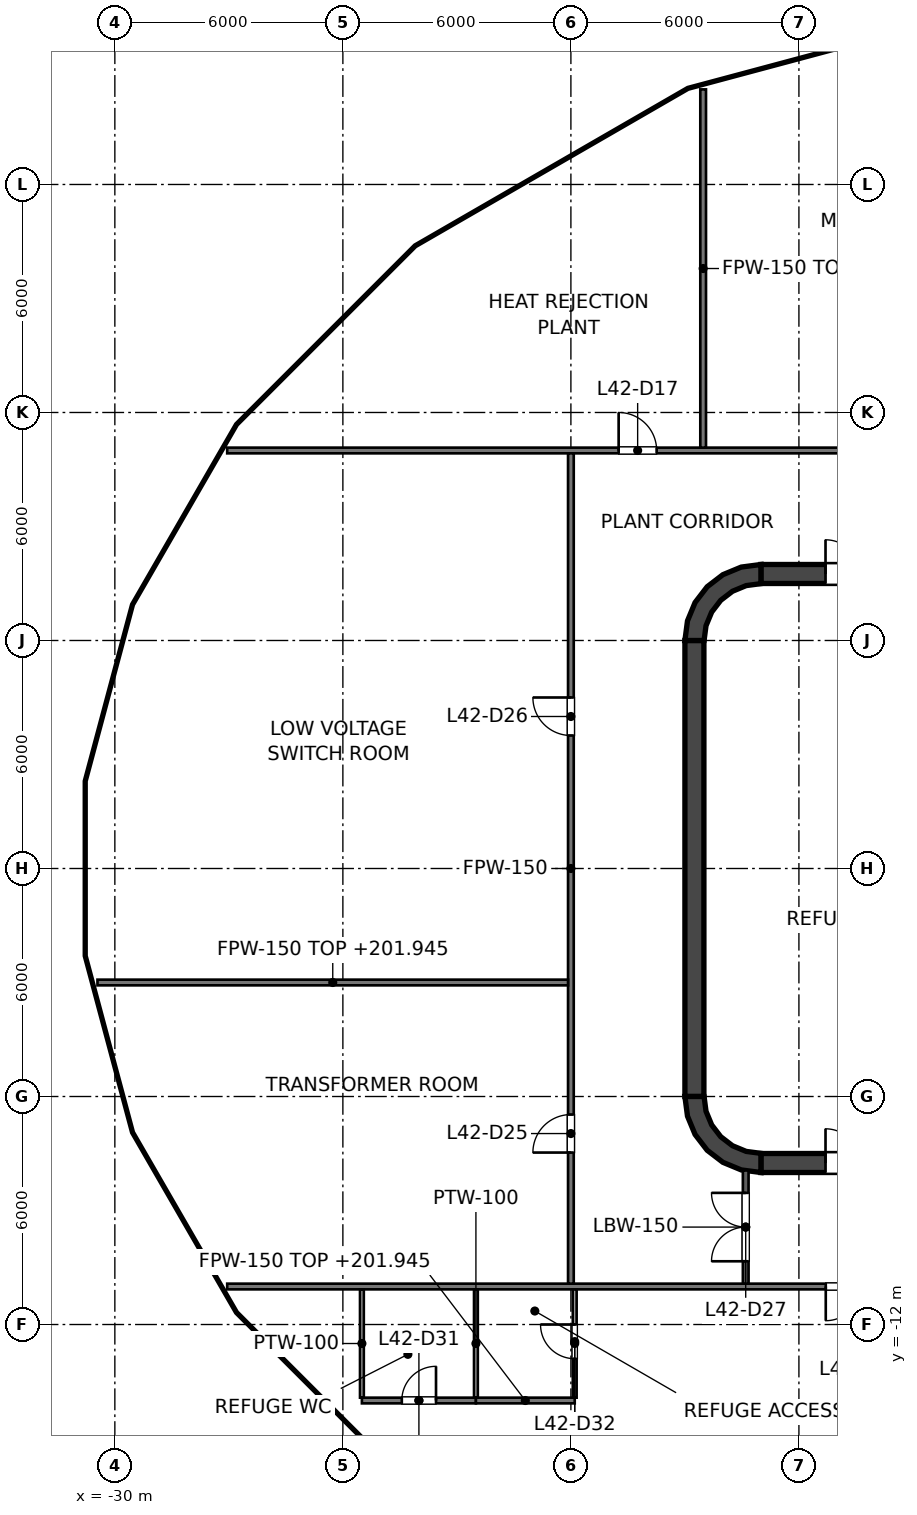
"""IFC4 building model, lengths in metres.
Left out: names, types, materials, properties, quantities, classifications, styles, units other than length and angle.
Written with IfcOpenShell. Run it as: python <this file> out.ifc"""

import sys

from ifc_helpers import new_model, si_unit, direction, frame, frame_2d, origin, place, context, subcontext, project, spatial, polyline, rectangle, outline, extrude, element, fill, save


model = new_model("IFC4")
c1 = context("Model", 3, precision=1e-05, world=origin(), true_north=direction((0.0, 1.0)))
c2 = subcontext(c1, "Body", "Model", "MODEL_VIEW")
j1 = project(units=[si_unit("LENGTHUNIT", "METRE"), si_unit("PLANEANGLEUNIT", "RADIAN")], contexts=[c1])
p1 = place(None, origin())
s1 = spatial("IfcSite", under=j1, at=p1, CompositionType="ELEMENT")
p2 = place(p1, origin())
s2 = spatial("IfcBuilding", under=s1, at=p2, CompositionType="ELEMENT")
p3 = place(p2, frame((0.0, 0.0, 197.6)))
s3 = spatial("IfcBuildingStorey", under=s2, at=p3, CompositionType="ELEMENT", Elevation=197.6)
p4 = place(p3, frame((-13.0, 7.75, 0.0), z_axis=(0.0, 0.0, 1.0), x_axis=(1.0, 0.0, 0.0)))
e1 = element("IfcWall", 1, at=p4, inside=s3, PredefinedType="SHEAR", context=c2, shape_type="SweptSolid", body=[
    extrude(rectangle(XDim=26.0, YDim=0.5, at=frame_2d((13.0, 0.0))), origin(), (0.0, 0.0, 1.0), 5.4),
])
p5 = place(p4, frame((1.7, 0.0, 0.0)))
e2 = element("IfcOpeningElement", 2, at=p5, cuts=e1, PredefinedType="OPENING", context=c2, shape_type="SweptSolid", body=[
    extrude(rectangle(XDim=1.8, YDim=2.1, at=frame_2d((0.9, 1.05))), frame((0.0, 0.25, 0.0), z_axis=(0.0, -1.0, 0.0), x_axis=(1.0, 0.0, 0.0)), (0.0, 0.0, 1.0), 0.5),
])
p6 = place(p4, frame((22.5, 0.0, 0.0)))
e3 = element("IfcOpeningElement", 3, at=p6, cuts=e1, PredefinedType="OPENING", context=c2, shape_type="SweptSolid", body=[
    extrude(rectangle(XDim=1.8, YDim=2.1, at=frame_2d((0.9, 1.05))), frame((0.0, 0.25, 0.0), z_axis=(0.0, -1.0, 0.0), x_axis=(1.0, 0.0, 0.0)), (0.0, 0.0, 1.0), 0.5),
])
p7 = place(p3, frame((-13.0, -7.75, 0.0), z_axis=(0.0, 0.0, 1.0), x_axis=(1.0, 0.0, 0.0)))
e4 = element("IfcWall", 4, at=p7, inside=s3, PredefinedType="SHEAR", context=c2, shape_type="SweptSolid", body=[
    extrude(rectangle(XDim=26.0, YDim=0.5, at=frame_2d((13.0, 0.0))), origin(), (0.0, 0.0, 1.0), 5.4),
])
p8 = place(p7, frame((1.7, 0.0, 0.0)))
e5 = element("IfcOpeningElement", 5, at=p8, cuts=e4, PredefinedType="OPENING", context=c2, shape_type="SweptSolid", body=[
    extrude(rectangle(XDim=1.8, YDim=2.1, at=frame_2d((0.9, 1.05))), frame((0.0, 0.25, 0.0), z_axis=(0.0, -1.0, 0.0), x_axis=(1.0, 0.0, 0.0)), (0.0, 0.0, 1.0), 0.5),
])
p9 = place(p7, frame((22.5, 0.0, 0.0)))
e6 = element("IfcOpeningElement", 6, at=p9, cuts=e4, PredefinedType="OPENING", context=c2, shape_type="SweptSolid", body=[
    extrude(rectangle(XDim=1.8, YDim=2.1, at=frame_2d((0.9, 1.05))), frame((0.0, 0.25, 0.0), z_axis=(0.0, -1.0, 0.0), x_axis=(1.0, 0.0, 0.0)), (0.0, 0.0, 1.0), 0.5),
])
p10 = place(p3, frame((-14.75, -6.0, 0.0), z_axis=(0.0, 0.0, 1.0), x_axis=(0.0, 1.0, 0.0)))
e7 = element("IfcWall", 7, at=p10, inside=s3, PredefinedType="SHEAR", context=c2, shape_type="SweptSolid", body=[
    extrude(rectangle(XDim=12.0, YDim=0.5, at=frame_2d((6.0, 0.0))), origin(), (0.0, 0.0, 1.0), 5.4),
])
p11 = place(p3, origin())
e8 = element("IfcWall", 8, at=p11, inside=s3, PredefinedType="SHEAR", context=c2, shape_type="SweptSolid", body=[
    extrude(outline(polyline([(-15.0, 6.0), (-14.496, 6.0), (-14.445, 6.387), (-14.295, 6.748), (-14.058, 7.058), (-13.748, 7.295), (-13.387, 7.445), (-13.0, 7.496), (-13.0, 8.0), (-13.518, 7.932), (-14.0, 7.732), (-14.414, 7.414), (-14.732, 7.0), (-14.932, 6.518), (-15.0, 6.0)])), origin(), (0.0, 0.0, 1.0), 5.4),
])
e9 = element("IfcWall", 9, at=p11, inside=s3, PredefinedType="SHEAR", context=c2, shape_type="SweptSolid", body=[
    extrude(outline(polyline([(-13.0, -8.0), (-13.0, -7.496), (-13.387, -7.445), (-13.748, -7.295), (-14.058, -7.058), (-14.295, -6.748), (-14.445, -6.387), (-14.496, -6.0), (-15.0, -6.0), (-14.932, -6.518), (-14.732, -7.0), (-14.414, -7.414), (-14.0, -7.732), (-13.518, -7.932), (-13.0, -8.0)])), origin(), (0.0, 0.0, 1.0), 5.4),
])
p12 = place(p3, frame((-11.8, -7.5, 0.0), z_axis=(0.0, 0.0, 1.0), x_axis=(0.0, 1.0, 0.0)))
e10 = element("IfcWall", 10, at=p12, inside=s3, PredefinedType="SOLIDWALL", context=c2, shape_type="SweptSolid", body=[
    extrude(rectangle(XDim=15.0, YDim=0.4, at=frame_2d((7.5, 0.0))), origin(), (0.0, 0.0, 1.0), 5.2),
])
p13 = place(p12, frame((13.697, 0.0, 0.0)))
e11 = element("IfcOpeningElement", 11, at=p13, cuts=e10, PredefinedType="OPENING", context=c2, shape_type="SweptSolid", body=[
    extrude(rectangle(XDim=0.9, YDim=2.1, at=frame_2d((0.45, 1.05))), frame((0.0, 0.2, 0.0), z_axis=(0.0, -1.0, 0.0), x_axis=(1.0, 0.0, 0.0)), (0.0, 0.0, 1.0), 0.4),
])
p14 = place(p12, frame((0.403, 0.0, 0.0)))
e12 = element("IfcOpeningElement", 12, at=p14, cuts=e10, PredefinedType="OPENING", context=c2, shape_type="SweptSolid", body=[
    extrude(rectangle(XDim=0.9, YDim=2.1, at=frame_2d((0.45, 1.05))), frame((0.0, 0.2, 0.0), z_axis=(0.0, -1.0, 0.0), x_axis=(1.0, 0.0, 0.0)), (0.0, 0.0, 1.0), 0.4),
])
e13 = element("IfcWall", 13, at=p11, inside=s3, PredefinedType="SOLIDWALL", context=c2, shape_type="SweptSolid", body=[
    extrude(outline(polyline([(-12.0, -5.925), (-12.0, -5.675), (-14.25, -5.675), (-14.25, -3.025), (-12.0, -3.025), (-12.0, -2.775), (-14.25, -2.775), (-14.25, -0.125), (-12.0, -0.125), (-12.0, 0.125), (-14.25, 0.125), (-14.25, 2.775), (-12.0, 2.775), (-12.0, 3.025), (-14.25, 3.025), (-14.25, 5.675), (-12.0, 5.675), (-12.0, 5.925), (-14.25, 5.925), (-14.5, 5.925), (-14.5, 5.675), (-14.5, 3.025), (-14.5, 2.775), (-14.5, 0.125), (-14.5, -0.125), (-14.5, -2.775), (-14.5, -3.025), (-14.5, -5.675), (-14.5, -5.925), (-14.25, -5.925), (-12.0, -5.925)])), origin(), (0.0, 0.0, 1.0), 5.2),
])
p15 = place(p3, frame((-27.044, 11.0, 0.0), z_axis=(0.0, 0.0, 1.0), x_axis=(1.0, 0.0, 0.0)))
e14 = element("IfcWall", 14, at=p15, inside=s3, PredefinedType="PARTITIONING", context=c2, shape_type="SweptSolid", body=[
    extrude(rectangle(XDim=54.087, YDim=0.15, at=frame_2d((27.044, 0.0))), origin(), (0.0, 0.0, 1.0), 4.277),
])
p16 = place(p15, frame((10.3, 0.0, 0.0)))
e15 = element("IfcOpeningElement", 15, at=p16, cuts=e14, PredefinedType="OPENING", context=c2, shape_type="SweptSolid", body=[
    extrude(rectangle(XDim=1.0, YDim=2.1, at=frame_2d((0.5, 1.05))), frame((0.0, 0.075, 0.0), z_axis=(0.0, -1.0, 0.0), x_axis=(1.0, 0.0, 0.0)), (0.0, 0.0, 1.0), 0.15),
])
p17 = place(p15, frame((17.3, 0.0, 0.0)))
e16 = element("IfcOpeningElement", 16, at=p17, cuts=e14, PredefinedType="OPENING", context=c2, shape_type="SweptSolid", body=[
    extrude(rectangle(XDim=1.0, YDim=2.1, at=frame_2d((0.5, 1.05))), frame((0.0, 0.075, 0.0), z_axis=(0.0, -1.0, 0.0), x_axis=(1.0, 0.0, 0.0)), (0.0, 0.0, 1.0), 0.15),
])
p18 = place(p15, frame((34.85, 0.0, 0.0)))
e17 = element("IfcOpeningElement", 17, at=p18, cuts=e14, PredefinedType="OPENING", context=c2, shape_type="SweptSolid", body=[
    extrude(rectangle(XDim=1.0, YDim=2.1, at=frame_2d((0.5, 1.05))), frame((0.0, 0.075, 0.0), z_axis=(0.0, -1.0, 0.0), x_axis=(1.0, 0.0, 0.0)), (0.0, 0.0, 1.0), 0.15),
])
p19 = place(p15, frame((42.8, 0.0, 0.0)))
e18 = element("IfcOpeningElement", 18, at=p19, cuts=e14, PredefinedType="OPENING", context=c2, shape_type="SweptSolid", body=[
    extrude(rectangle(XDim=1.0, YDim=2.1, at=frame_2d((0.5, 1.05))), frame((0.0, 0.075, 0.0), z_axis=(0.0, -1.0, 0.0), x_axis=(1.0, 0.0, 0.0)), (0.0, 0.0, 1.0), 0.15),
])
p20 = place(p15, frame((25.15, 0.0, 0.0)))
e19 = element("IfcOpeningElement", 19, at=p20, cuts=e14, PredefinedType="OPENING", context=c2, shape_type="SweptSolid", body=[
    extrude(rectangle(XDim=1.8, YDim=2.1, at=frame_2d((0.9, 1.05))), frame((0.0, 0.075, 0.0), z_axis=(0.0, -1.0, 0.0), x_axis=(1.0, 0.0, 0.0)), (0.0, 0.0, 1.0), 0.15),
])
p21 = place(p3, frame((-27.044, -11.0, 0.0), z_axis=(0.0, 0.0, 1.0), x_axis=(1.0, 0.0, 0.0)))
e20 = element("IfcWall", 20, at=p21, inside=s3, PredefinedType="PARTITIONING", context=c2, shape_type="SweptSolid", body=[
    extrude(rectangle(XDim=54.087, YDim=0.15, at=frame_2d((27.044, 0.0))), origin(), (0.0, 0.0, 1.0), 4.277),
])
p22 = place(p21, frame((36.0, 0.0, 0.0)))
e21 = element("IfcOpeningElement", 21, at=p22, cuts=e20, PredefinedType="OPENING", context=c2, shape_type="SweptSolid", body=[
    extrude(rectangle(XDim=1.0, YDim=2.1, at=frame_2d((0.5, 1.05))), frame((0.0, 0.075, 0.0), z_axis=(0.0, -1.0, 0.0), x_axis=(1.0, 0.0, 0.0)), (0.0, 0.0, 1.0), 0.15),
])
p23 = place(p21, frame((43.05, 0.0, 0.0)))
e22 = element("IfcOpeningElement", 22, at=p23, cuts=e20, PredefinedType="OPENING", context=c2, shape_type="SweptSolid", body=[
    extrude(rectangle(XDim=1.0, YDim=2.1, at=frame_2d((0.5, 1.05))), frame((0.0, 0.075, 0.0), z_axis=(0.0, -1.0, 0.0), x_axis=(1.0, 0.0, 0.0)), (0.0, 0.0, 1.0), 0.15),
])
p24 = place(p21, frame((15.75, 0.0, 0.0)))
e23 = element("IfcOpeningElement", 23, at=p24, cuts=e20, PredefinedType="OPENING", context=c2, shape_type="SweptSolid", body=[
    extrude(rectangle(XDim=1.8, YDim=2.1, at=frame_2d((0.9, 1.05))), frame((0.0, 0.075, 0.0), z_axis=(0.0, -1.0, 0.0), x_axis=(1.0, 0.0, 0.0)), (0.0, 0.0, 1.0), 0.15),
])
p25 = place(p21, frame((21.45, 0.0, 0.0)))
e24 = element("IfcOpeningElement", 24, at=p25, cuts=e20, PredefinedType="OPENING", context=c2, shape_type="SweptSolid", body=[
    extrude(rectangle(XDim=1.8, YDim=2.1, at=frame_2d((0.9, 1.05))), frame((0.0, 0.075, 0.0), z_axis=(0.0, -1.0, 0.0), x_axis=(1.0, 0.0, 0.0)), (0.0, 0.0, 1.0), 0.15),
])
p26 = place(p21, frame((27.15, 0.0, 0.0)))
e25 = element("IfcOpeningElement", 25, at=p26, cuts=e20, PredefinedType="OPENING", context=c2, shape_type="SweptSolid", body=[
    extrude(rectangle(XDim=1.8, YDim=2.1, at=frame_2d((0.9, 1.05))), frame((0.0, 0.075, 0.0), z_axis=(0.0, -1.0, 0.0), x_axis=(1.0, 0.0, 0.0)), (0.0, 0.0, 1.0), 0.15),
])
p27 = place(p3, frame((-18.0, -10.925, 0.0), z_axis=(0.0, 0.0, 1.0), x_axis=(0.0, 1.0, 0.0)))
e26 = element("IfcWall", 26, at=p27, inside=s3, PredefinedType="PARTITIONING", context=c2, shape_type="SweptSolid", body=[
    extrude(rectangle(XDim=21.85, YDim=0.15, at=frame_2d((10.925, 0.0))), origin(), (0.0, 0.0, 1.0), 4.277),
])
p28 = place(p27, frame((3.45, 0.0, 0.0)))
e27 = element("IfcOpeningElement", 27, at=p28, cuts=e26, PredefinedType="OPENING", context=c2, shape_type="SweptSolid", body=[
    extrude(rectangle(XDim=1.0, YDim=2.1, at=frame_2d((0.5, 1.05))), frame((0.0, 0.075, 0.0), z_axis=(0.0, -1.0, 0.0), x_axis=(1.0, 0.0, 0.0)), (0.0, 0.0, 1.0), 0.15),
])
p29 = place(p27, frame((14.425, 0.0, 0.0)))
e28 = element("IfcOpeningElement", 28, at=p29, cuts=e26, PredefinedType="OPENING", context=c2, shape_type="SweptSolid", body=[
    extrude(rectangle(XDim=1.0, YDim=2.1, at=frame_2d((0.5, 1.05))), frame((0.0, 0.075, 0.0), z_axis=(0.0, -1.0, 0.0), x_axis=(1.0, 0.0, 0.0)), (0.0, 0.0, 1.0), 0.15),
])
p30 = place(p3, frame((-13.4, -10.925, 0.0), z_axis=(0.0, 0.0, 1.0), x_axis=(0.0, 1.0, 0.0)))
e29 = element("IfcWall", 29, at=p30, inside=s3, PredefinedType="PARTITIONING", context=c2, shape_type="SweptSolid", body=[
    extrude(rectangle(XDim=2.978, YDim=0.15, at=frame_2d((1.489, 0.0))), origin(), (0.0, 0.0, 1.0), 4.345),
])
p31 = place(p30, frame((0.589, 0.0, 0.0)))
e30 = element("IfcOpeningElement", 30, at=p31, cuts=e29, PredefinedType="OPENING", context=c2, shape_type="SweptSolid", body=[
    extrude(rectangle(XDim=1.8, YDim=2.1, at=frame_2d((0.9, 1.05))), frame((0.0, 0.075, 0.0), z_axis=(0.0, -1.0, 0.0), x_axis=(1.0, 0.0, 0.0)), (0.0, 0.0, 1.0), 0.15),
])
p32 = place(p3, frame((-14.52, 11.075, 0.0), z_axis=(0.0, 0.0, 1.0), x_axis=(0.0, 1.0, 0.0)))
e31 = element("IfcWall", 31, at=p32, inside=s3, PredefinedType="PARTITIONING", context=c2, shape_type="SweptSolid", body=[
    extrude(rectangle(XDim=9.427, YDim=0.15, at=frame_2d((4.714, 0.0))), origin(), (0.0, 0.0, 1.0), 4.345),
])
p33 = place(p3, frame((-18.075, -3.0, 0.0), z_axis=(0.0, 0.0, 1.0), x_axis=(-1.0, 0.0, 0.0)))
e32 = element("IfcWall", 32, at=p33, inside=s3, PredefinedType="PARTITIONING", context=c2, shape_type="SweptSolid", body=[
    extrude(rectangle(XDim=12.383, YDim=0.15, at=frame_2d((6.191, 0.0))), origin(), (0.0, 0.0, 1.0), 4.345),
])
p34 = place(p3, frame((-23.499, -14.0, 0.0), z_axis=(0.0, 0.0, 1.0), x_axis=(1.0, 0.0, 0.0)))
e33 = element("IfcWall", 33, at=p34, inside=s3, PredefinedType="PARTITIONING", context=c2, shape_type="SweptSolid", body=[
    extrude(rectangle(XDim=3.0, YDim=0.15, at=frame_2d((1.5, 0.0))), origin(), (0.0, 0.0, 1.0), 5.2),
])
p35 = place(p34, frame((1.05, 0.0, 0.0)))
e34 = element("IfcOpeningElement", 34, at=p35, cuts=e33, PredefinedType="OPENING", context=c2, shape_type="SweptSolid", body=[
    extrude(rectangle(XDim=0.9, YDim=2.1, at=frame_2d((0.45, 1.05))), frame((0.0, 0.075, 0.0), z_axis=(0.0, -1.0, 0.0), x_axis=(1.0, 0.0, 0.0)), (0.0, 0.0, 1.0), 0.15),
])
p36 = place(p3, frame((-20.499, -14.0, 0.0), z_axis=(0.0, 0.0, 1.0), x_axis=(1.0, 0.0, 0.0)))
e35 = element("IfcWall", 35, at=p36, inside=s3, PredefinedType="PARTITIONING", context=c2, shape_type="SweptSolid", body=[
    extrude(rectangle(XDim=2.6, YDim=0.15, at=frame_2d((1.3, 0.0))), origin(), (0.0, 0.0, 1.0), 4.345),
])
for number, where, z_axis, x_axis in (
    (36, (-23.499, -13.925, 0.0), (0.0, 0.0, 1.0), (0.0, 1.0, 0.0)),
    (37, (-20.499, -13.925, 0.0), (0.0, 0.0, 1.0), (0.0, 1.0, 0.0)),
):
    element("IfcWall", number, at=place(p3, frame(where, z_axis=z_axis, x_axis=x_axis)), inside=s3, PredefinedType="PARTITIONING", context=c2, shape_type="SweptSolid", body=[
        extrude(rectangle(XDim=2.85, YDim=0.1, at=frame_2d((1.425, 0.0))), origin(), (0.0, 0.0, 1.0), 4.502),
    ])
p37 = place(p3, frame((-17.899, -13.925, 0.0), z_axis=(0.0, 0.0, 1.0), x_axis=(0.0, 1.0, 0.0)))
e38 = element("IfcWall", 38, at=p37, inside=s3, PredefinedType="PARTITIONING", context=c2, shape_type="SweptSolid", body=[
    extrude(rectangle(XDim=2.85, YDim=0.1, at=frame_2d((1.425, 0.0))), origin(), (0.0, 0.0, 1.0), 4.345),
])
p38 = place(p37, frame((1.025, 0.0, 0.0)))
e39 = element("IfcOpeningElement", 39, at=p38, cuts=e38, PredefinedType="OPENING", context=c2, shape_type="SweptSolid", body=[
    extrude(rectangle(XDim=0.9, YDim=2.1, at=frame_2d((0.45, 1.05))), frame((0.0, 0.05, 0.0), z_axis=(0.0, -1.0, 0.0), x_axis=(1.0, 0.0, 0.0)), (0.0, 0.0, 1.0), 0.1),
])
p39 = place(p13, origin())
e40 = element("IfcDoor", 40, at=p39, inside=s3, OperationType="SINGLE_SWING_LEFT", PredefinedType="DOOR", context=c2, shape_type="SweptSolid", body=[
    extrude(rectangle(XDim=0.9, YDim=2.1, at=frame_2d((0.45, 1.05))), frame((0.0, 0.025, 0.0), z_axis=(0.0, -1.0, 0.0), x_axis=(1.0, 0.0, 0.0)), (0.0, 0.0, 1.0), 0.05),
])
fill(e11, e40)
p40 = place(p14, origin())
e41 = element("IfcDoor", 41, at=p40, inside=s3, OperationType="SINGLE_SWING_LEFT", PredefinedType="DOOR", context=c2, shape_type="SweptSolid", body=[
    extrude(rectangle(XDim=0.9, YDim=2.1, at=frame_2d((0.45, 1.05))), frame((0.0, 0.025, 0.0), z_axis=(0.0, -1.0, 0.0), x_axis=(1.0, 0.0, 0.0)), (0.0, 0.0, 1.0), 0.05),
])
fill(e12, e41)
p41 = place(p5, origin())
e42 = element("IfcDoor", 42, at=p41, inside=s3, OperationType="DOUBLE_DOOR_SINGLE_SWING", PredefinedType="DOOR", context=c2, shape_type="SweptSolid", body=[
    extrude(rectangle(XDim=1.8, YDim=2.1, at=frame_2d((0.9, 1.05))), frame((0.0, 0.025, 0.0), z_axis=(0.0, -1.0, 0.0), x_axis=(1.0, 0.0, 0.0)), (0.0, 0.0, 1.0), 0.05),
])
fill(e2, e42)
p42 = place(p8, origin())
e43 = element("IfcDoor", 43, at=p42, inside=s3, OperationType="DOUBLE_DOOR_SINGLE_SWING", PredefinedType="DOOR", context=c2, shape_type="SweptSolid", body=[
    extrude(rectangle(XDim=1.8, YDim=2.1, at=frame_2d((0.9, 1.05))), frame((0.0, 0.025, 0.0), z_axis=(0.0, -1.0, 0.0), x_axis=(1.0, 0.0, 0.0)), (0.0, 0.0, 1.0), 0.05),
])
fill(e5, e43)
p43 = place(p16, origin())
e44 = element("IfcDoor", 44, at=p43, inside=s3, OperationType="SINGLE_SWING_LEFT", PredefinedType="DOOR", context=c2, shape_type="SweptSolid", body=[
    extrude(rectangle(XDim=1.0, YDim=2.1, at=frame_2d((0.5, 1.05))), frame((0.0, 0.025, 0.0), z_axis=(0.0, -1.0, 0.0), x_axis=(1.0, 0.0, 0.0)), (0.0, 0.0, 1.0), 0.05),
])
fill(e15, e44)
p44 = place(p28, origin())
e45 = element("IfcDoor", 45, at=p44, inside=s3, OperationType="SINGLE_SWING_LEFT", PredefinedType="DOOR", context=c2, shape_type="SweptSolid", body=[
    extrude(rectangle(XDim=1.0, YDim=2.1, at=frame_2d((0.5, 1.05))), frame((0.0, 0.025, 0.0), z_axis=(0.0, -1.0, 0.0), x_axis=(1.0, 0.0, 0.0)), (0.0, 0.0, 1.0), 0.05),
])
fill(e27, e45)
p45 = place(p29, origin())
e46 = element("IfcDoor", 46, at=p45, inside=s3, OperationType="SINGLE_SWING_RIGHT", PredefinedType="DOOR", context=c2, shape_type="SweptSolid", body=[
    extrude(rectangle(XDim=1.0, YDim=2.1, at=frame_2d((0.5, 1.05))), frame((0.0, 0.025, 0.0), z_axis=(0.0, -1.0, 0.0), x_axis=(1.0, 0.0, 0.0)), (0.0, 0.0, 1.0), 0.05),
])
fill(e28, e46)
p46 = place(p31, origin())
e47 = element("IfcDoor", 47, at=p46, inside=s3, OperationType="DOUBLE_DOOR_SINGLE_SWING", PredefinedType="DOOR", context=c2, shape_type="SweptSolid", body=[
    extrude(rectangle(XDim=1.8, YDim=2.1, at=frame_2d((0.9, 1.05))), frame((0.0, 0.025, 0.0), z_axis=(0.0, -1.0, 0.0), x_axis=(1.0, 0.0, 0.0)), (0.0, 0.0, 1.0), 0.05),
])
fill(e30, e47)
p47 = place(p24, origin())
e48 = element("IfcDoor", 48, at=p47, inside=s3, OperationType="DOUBLE_DOOR_SINGLE_SWING", PredefinedType="DOOR", context=c2, shape_type="SweptSolid", body=[
    extrude(rectangle(XDim=1.8, YDim=2.1, at=frame_2d((0.9, 1.05))), frame((0.0, 0.025, 0.0), z_axis=(0.0, -1.0, 0.0), x_axis=(1.0, 0.0, 0.0)), (0.0, 0.0, 1.0), 0.05),
])
fill(e23, e48)
p48 = place(p35, origin())
e49 = element("IfcDoor", 49, at=p48, inside=s3, OperationType="SINGLE_SWING_RIGHT", PredefinedType="DOOR", context=c2, shape_type="SweptSolid", body=[
    extrude(rectangle(XDim=0.9, YDim=2.1, at=frame_2d((0.45, 1.05))), frame((0.0, 0.025, 0.0), z_axis=(0.0, -1.0, 0.0), x_axis=(1.0, 0.0, 0.0)), (0.0, 0.0, 1.0), 0.05),
])
fill(e34, e49)
p49 = place(p38, origin())
e50 = element("IfcDoor", 50, at=p49, inside=s3, OperationType="SINGLE_SWING_RIGHT", PredefinedType="DOOR", context=c2, shape_type="SweptSolid", body=[
    extrude(rectangle(XDim=0.9, YDim=2.1, at=frame_2d((0.45, 1.05))), frame((0.0, 0.025, 0.0), z_axis=(0.0, -1.0, 0.0), x_axis=(1.0, 0.0, 0.0)), (0.0, 0.0, 1.0), 0.05),
])
fill(e39, e50)
save(model, sys.argv[1])
